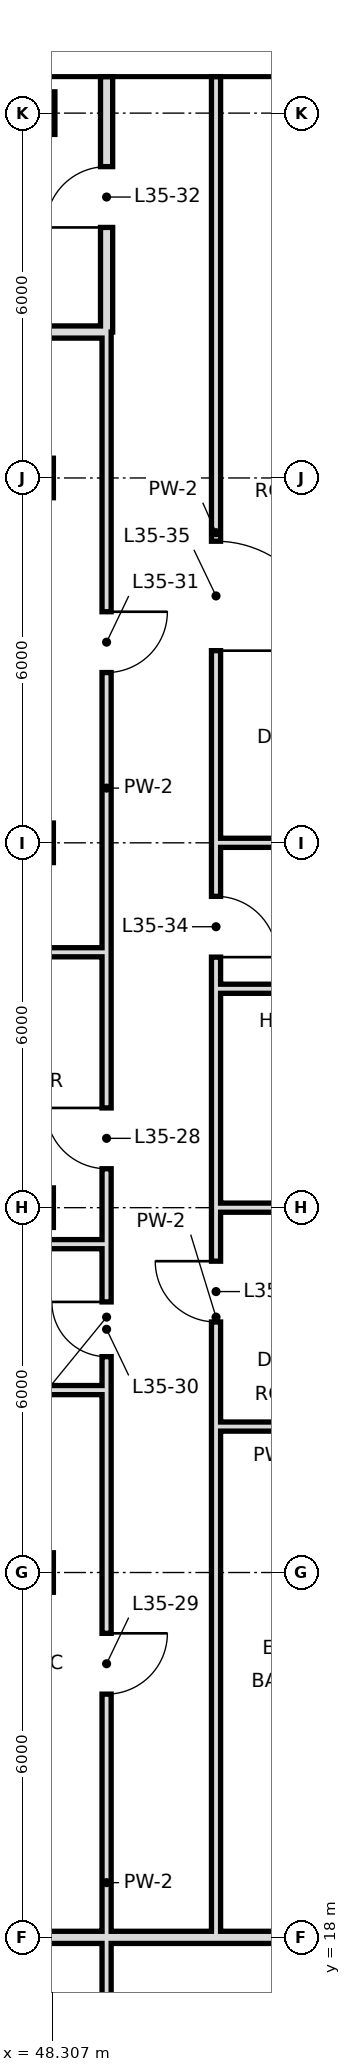
"""IFC4 building model, lengths in metres.
Left out: names, types, materials, properties, quantities, classifications, styles, units other than length and angle.
Written with IfcOpenShell. Run it as: python <this file> out.ifc"""

import sys

from ifc_helpers import new_model, si_unit, direction, frame, frame_2d, origin, origin_2d, place, context, subcontext, project, spatial, rectangle, hollow_rectangle, extrude, element, fill, save


model = new_model("IFC4")
c1 = context("Model", 3, precision=1e-05, world=origin(), true_north=direction((0.0, 1.0)))
c2 = subcontext(c1, "Body", "Model", "MODEL_VIEW")
j1 = project(units=[si_unit("LENGTHUNIT", "METRE"), si_unit("PLANEANGLEUNIT", "RADIAN")], contexts=[c1])
p1 = place(None, origin())
s1 = spatial("IfcSite", under=j1, at=p1, CompositionType="ELEMENT")
p2 = place(p1, origin())
s2 = spatial("IfcBuilding", under=s1, at=p2, CompositionType="ELEMENT")
p3 = place(p2, frame((0.0, 0.0, 154.6)))
s3 = spatial("IfcBuildingStorey", under=s2, at=p3, CompositionType="ELEMENT", Elevation=154.6)
for number, where, z_axis, x_axis in (
    (1, (48.0, 24.0, 0.0), (0.0, 0.0, 1.0), (1.0, 0.0, 0.0)),
    (2, (48.0, 30.0, 0.0), (0.0, 0.0, 1.0), (1.0, 0.0, 0.0)),
    (3, (48.0, 36.0, 0.0), (0.0, 0.0, 1.0), (1.0, 0.0, 0.0)),
    (4, (48.0, 42.0, 0.0), (0.0, 0.0, 1.0), (1.0, 0.0, 0.0)),
):
    element("IfcColumn", number, at=place(p3, frame(where, z_axis=z_axis, x_axis=x_axis)), inside=s3, PredefinedType="COLUMN", context=c2, shape_type="SweptSolid", body=[
        extrude(hollow_rectangle(XDim=0.65, YDim=0.65, WallThickness=0.032, at=origin_2d()), origin(), (0.0, 0.0, 1.0), 3.6),
    ])
p4 = place(p3, frame((48.0, 48.0, 0.0), z_axis=(0.0, 0.0, 1.0), x_axis=(1.0, 0.0, 0.0)))
e5 = element("IfcColumn", 5, at=p4, inside=s3, PredefinedType="COLUMN", context=c2, shape_type="SweptSolid", body=[
    extrude(hollow_rectangle(XDim=0.7, YDim=0.7, WallThickness=0.036, at=origin_2d()), origin(), (0.0, 0.0, 1.0), 3.6),
])
p5 = place(p3, frame((49.2, 44.4, 0.0), z_axis=(0.0, 0.0, 1.0), x_axis=(0.0, 1.0, 0.0)))
e6 = element("IfcWall", 6, at=p5, inside=s3, PredefinedType="SOLIDWALL", context=c2, shape_type="SweptSolid", body=[
    extrude(rectangle(XDim=4.2, YDim=0.2, at=frame_2d((2.1, 0.0))), origin(), (0.0, 0.0, 1.0), 2.97),
])
p6 = place(p5, frame((1.72, 0.0, 0.0)))
e7 = element("IfcOpeningElement", 7, at=p6, cuts=e6, PredefinedType="OPENING", context=c2, shape_type="SweptSolid", body=[
    extrude(rectangle(XDim=1.0, YDim=2.4, at=frame_2d((0.5, 1.2))), frame((0.0, 0.11, 0.0), z_axis=(0.0, -1.0, 0.0), x_axis=(1.0, 0.0, 0.0)), (0.0, 0.0, 1.0), 0.22),
])
p7 = place(p3, frame((49.2, 10.8, 0.0), z_axis=(0.0, 0.0, 1.0), x_axis=(0.0, 1.0, 0.0)))
e8 = element("IfcWall", 8, at=p7, inside=s3, PredefinedType="PARTITIONING", context=c2, shape_type="SweptSolid", body=[
    extrude(rectangle(XDim=16.2, YDim=0.15, at=frame_2d((8.1, 0.0))), origin(), (0.0, 0.0, 1.0), 3.42),
])
p8 = place(p7, frame((11.2, 0.0, 0.0)))
e9 = element("IfcOpeningElement", 9, at=p8, cuts=e8, PredefinedType="OPENING", context=c2, shape_type="SweptSolid", body=[
    extrude(rectangle(XDim=1.0, YDim=2.4, at=frame_2d((0.5, 1.2))), frame((0.0, 0.085, 0.0), z_axis=(0.0, -1.0, 0.0), x_axis=(1.0, 0.0, 0.0)), (0.0, 0.0, 1.0), 0.17),
])
p9 = place(p3, frame((49.2, 29.4, 0.0), z_axis=(0.0, 0.0, 1.0), x_axis=(0.0, 1.0, 0.0)))
e10 = element("IfcWall", 10, at=p9, inside=s3, PredefinedType="PARTITIONING", context=c2, shape_type="SweptSolid", body=[
    extrude(rectangle(XDim=15.0, YDim=0.15, at=frame_2d((7.5, 0.0))), origin(), (0.0, 0.0, 1.0), 3.42),
])
p10 = place(p9, frame((1.24, 0.0, 0.0)))
e11 = element("IfcOpeningElement", 11, at=p10, cuts=e10, PredefinedType="OPENING", context=c2, shape_type="SweptSolid", body=[
    extrude(rectangle(XDim=1.0, YDim=2.4, at=frame_2d((0.5, 1.2))), frame((0.0, 0.085, 0.0), z_axis=(0.0, -1.0, 0.0), x_axis=(1.0, 0.0, 0.0)), (0.0, 0.0, 1.0), 0.17),
])
p11 = place(p9, frame((9.4, 0.0, 0.0)))
e12 = element("IfcOpeningElement", 12, at=p11, cuts=e10, PredefinedType="OPENING", context=c2, shape_type="SweptSolid", body=[
    extrude(rectangle(XDim=1.0, YDim=2.4, at=frame_2d((0.5, 1.2))), frame((0.0, 0.085, 0.0), z_axis=(0.0, -1.0, 0.0), x_axis=(1.0, 0.0, 0.0)), (0.0, 0.0, 1.0), 0.17),
])
p12 = place(p3, frame((49.2, 27.0, 0.0), z_axis=(0.0, 0.0, 1.0), x_axis=(0.0, 1.0, 0.0)))
e13 = element("IfcWall", 13, at=p12, inside=s3, PredefinedType="PARTITIONING", context=c2, shape_type="SweptSolid", body=[
    extrude(rectangle(XDim=2.4, YDim=0.15, at=frame_2d((1.2, 0.0))), origin(), (0.0, 0.0, 1.0), 3.42),
])
p13 = place(p12, frame((0.55, 0.0, 0.0)))
e14 = element("IfcOpeningElement", 14, at=p13, cuts=e13, PredefinedType="OPENING", context=c2, shape_type="SweptSolid", body=[
    extrude(rectangle(XDim=0.9, YDim=2.4, at=frame_2d((0.45, 1.2))), frame((0.0, 0.085, 0.0), z_axis=(0.0, -1.0, 0.0), x_axis=(1.0, 0.0, 0.0)), (0.0, 0.0, 1.0), 0.17),
])
p14 = place(p3, frame((51.0, 26.4, 0.0), z_axis=(0.0, 0.0, 1.0), x_axis=(0.0, 1.0, 0.0)))
e15 = element("IfcWall", 15, at=p14, inside=s3, PredefinedType="PARTITIONING", context=c2, shape_type="SweptSolid", body=[
    extrude(rectangle(XDim=3.6, YDim=0.15, at=frame_2d((1.8, 0.0))), origin(), (0.0, 0.0, 1.0), 3.42),
])
p15 = place(p14, frame((1.72, 0.0, 0.0)))
e16 = element("IfcOpeningElement", 16, at=p15, cuts=e15, PredefinedType="OPENING", context=c2, shape_type="SweptSolid", body=[
    extrude(rectangle(XDim=1.0, YDim=2.4, at=frame_2d((0.5, 1.2))), frame((0.0, 0.085, 0.0), z_axis=(0.0, -1.0, 0.0), x_axis=(1.0, 0.0, 0.0)), (0.0, 0.0, 1.0), 0.17),
])
p16 = place(p3, frame((51.0, 33.6, 0.0), z_axis=(0.0, 0.0, 1.0), x_axis=(0.0, 1.0, 0.0)))
e17 = element("IfcWall", 17, at=p16, inside=s3, PredefinedType="PARTITIONING", context=c2, shape_type="SweptSolid", body=[
    extrude(rectangle(XDim=15.0, YDim=0.15, at=frame_2d((7.5, 0.0))), origin(), (0.0, 0.0, 1.0), 3.42),
])
p17 = place(p16, frame((0.52, 0.0, 0.0)))
e18 = element("IfcOpeningElement", 18, at=p17, cuts=e17, PredefinedType="OPENING", context=c2, shape_type="SweptSolid", body=[
    extrude(rectangle(XDim=1.0, YDim=2.4, at=frame_2d((0.5, 1.2))), frame((0.0, 0.085, 0.0), z_axis=(0.0, -1.0, 0.0), x_axis=(1.0, 0.0, 0.0)), (0.0, 0.0, 1.0), 0.17),
])
p18 = place(p16, frame((5.56, 0.0, 0.0)))
e19 = element("IfcOpeningElement", 19, at=p18, cuts=e17, PredefinedType="OPENING", context=c2, shape_type="SweptSolid", body=[
    extrude(rectangle(XDim=1.8, YDim=2.4, at=frame_2d((0.9, 1.2))), frame((0.0, 0.085, 0.0), z_axis=(0.0, -1.0, 0.0), x_axis=(1.0, 0.0, 0.0)), (0.0, 0.0, 1.0), 0.17),
])
p19 = place(p3, frame((51.0, 18.0, 0.0), z_axis=(0.0, 0.0, 1.0), x_axis=(0.0, 1.0, 0.0)))
e20 = element("IfcWall", 20, at=p19, inside=s3, PredefinedType="PARTITIONING", context=c2, shape_type="SweptSolid", body=[
    extrude(rectangle(XDim=8.4, YDim=0.15, at=frame_2d((4.2, 0.0))), origin(), (0.0, 0.0, 1.0), 3.42),
])
p20 = place(p3, frame((51.0, 30.0, 0.0), z_axis=(0.0, 0.0, 1.0), x_axis=(0.0, 1.0, 0.0)))
e21 = element("IfcWall", 21, at=p20, inside=s3, PredefinedType="PARTITIONING", context=c2, shape_type="SweptSolid", body=[
    extrude(rectangle(XDim=3.6, YDim=0.15, at=frame_2d((1.8, 0.0))), origin(), (0.0, 0.0, 1.0), 3.42),
])
p21 = place(p3, frame((44.9, 18.0, 0.0), z_axis=(0.0, 0.0, 1.0), x_axis=(1.0, 0.0, 0.0)))
e22 = element("IfcWall", 22, at=p21, inside=s3, PredefinedType="SOLIDWALL", context=c2, shape_type="SweptSolid", body=[
    extrude(rectangle(XDim=15.7, YDim=0.2, at=frame_2d((7.85, 0.0))), origin(), (0.0, 0.0, 1.0), 2.72),
])
p22 = place(p3, frame((51.0, 26.4, 0.0), z_axis=(0.0, 0.0, 1.0), x_axis=(1.0, 0.0, 0.0)))
e23 = element("IfcWall", 23, at=p22, inside=s3, PredefinedType="PARTITIONING", context=c2, shape_type="SweptSolid", body=[
    extrude(rectangle(XDim=3.0, YDim=0.15, at=frame_2d((1.5, 0.0))), origin(), (0.0, 0.0, 1.0), 3.42),
])
for number, where, z_axis, x_axis in (
    (24, (44.9, 27.0, 0.0), (0.0, 0.0, 1.0), (1.0, 0.0, 0.0)),
    (25, (44.9, 29.4, 0.0), (0.0, 0.0, 1.0), (1.0, 0.0, 0.0)),
):
    element("IfcWall", number, at=place(p3, frame(where, z_axis=z_axis, x_axis=x_axis)), inside=s3, PredefinedType="PARTITIONING", context=c2, shape_type="SweptSolid", body=[
        extrude(rectangle(XDim=4.3, YDim=0.15, at=frame_2d((2.15, 0.0))), origin(), (0.0, 0.0, 1.0), 3.42),
    ])
p23 = place(p3, frame((51.0, 30.0, 0.0), z_axis=(0.0, 0.0, 1.0), x_axis=(1.0, 0.0, 0.0)))
e26 = element("IfcWall", 26, at=p23, inside=s3, PredefinedType="PARTITIONING", context=c2, shape_type="SweptSolid", body=[
    extrude(rectangle(XDim=3.0, YDim=0.15, at=frame_2d((1.5, 0.0))), origin(), (0.0, 0.0, 1.0), 2.72),
])
p24 = place(p3, frame((51.0, 33.6, 0.0), z_axis=(0.0, 0.0, 1.0), x_axis=(1.0, 0.0, 0.0)))
e27 = element("IfcWall", 27, at=p24, inside=s3, PredefinedType="PARTITIONING", context=c2, shape_type="SweptSolid", body=[
    extrude(rectangle(XDim=3.0, YDim=0.15, at=frame_2d((1.5, 0.0))), origin(), (0.0, 0.0, 1.0), 3.42),
])
p25 = place(p3, frame((44.9, 34.2, 0.0), z_axis=(0.0, 0.0, 1.0), x_axis=(1.0, 0.0, 0.0)))
e28 = element("IfcWall", 28, at=p25, inside=s3, PredefinedType="PARTITIONING", context=c2, shape_type="SweptSolid", body=[
    extrude(rectangle(XDim=4.3, YDim=0.15, at=frame_2d((2.15, 0.0))), origin(), (0.0, 0.0, 1.0), 3.42),
])
p26 = place(p3, frame((51.0, 36.0, 0.0), z_axis=(0.0, 0.0, 1.0), x_axis=(1.0, 0.0, 0.0)))
e29 = element("IfcWall", 29, at=p26, inside=s3, PredefinedType="PARTITIONING", context=c2, shape_type="SweptSolid", body=[
    extrude(rectangle(XDim=9.0, YDim=0.15, at=frame_2d((4.5, 0.0))), origin(), (0.0, 0.0, 1.0), 2.72),
])
p27 = place(p3, frame((44.9, 44.4, 0.0), z_axis=(0.0, 0.0, 1.0), x_axis=(1.0, 0.0, 0.0)))
e30 = element("IfcWall", 30, at=p27, inside=s3, PredefinedType="SOLIDWALL", context=c2, shape_type="SweptSolid", body=[
    extrude(rectangle(XDim=4.3, YDim=0.2, at=frame_2d((2.15, 0.0))), origin(), (0.0, 0.0, 1.0), 2.97),
])
p28 = place(p10, frame((1.0, 0.0, 0.0), z_axis=(0.0, 0.0, 1.0), x_axis=(-1.0, 0.0, 0.0)))
e31 = element("IfcDoor", 31, at=p28, inside=s3, OperationType="SINGLE_SWING_LEFT", PredefinedType="DOOR", context=c2, shape_type="SweptSolid", body=[
    extrude(rectangle(XDim=1.0, YDim=2.4, at=frame_2d((0.5, 1.2))), frame((0.0, 0.025, 0.0), z_axis=(0.0, -1.0, 0.0), x_axis=(1.0, 0.0, 0.0)), (0.0, 0.0, 1.0), 0.05),
])
fill(e11, e31)
p29 = place(p8, origin())
e32 = element("IfcDoor", 32, at=p29, inside=s3, OperationType="SINGLE_SWING_RIGHT", PredefinedType="DOOR", context=c2, shape_type="SweptSolid", body=[
    extrude(rectangle(XDim=1.0, YDim=2.4, at=frame_2d((0.5, 1.2))), frame((0.0, 0.025, 0.0), z_axis=(0.0, -1.0, 0.0), x_axis=(1.0, 0.0, 0.0)), (0.0, 0.0, 1.0), 0.05),
])
fill(e9, e32)
p30 = place(p13, frame((0.9, 0.0, 0.0), z_axis=(0.0, 0.0, 1.0), x_axis=(-1.0, 0.0, 0.0)))
e33 = element("IfcDoor", 33, at=p30, inside=s3, OperationType="SINGLE_SWING_LEFT", PredefinedType="DOOR", context=c2, shape_type="SweptSolid", body=[
    extrude(rectangle(XDim=0.9, YDim=2.4, at=frame_2d((0.45, 1.2))), frame((0.0, 0.025, 0.0), z_axis=(0.0, -1.0, 0.0), x_axis=(1.0, 0.0, 0.0)), (0.0, 0.0, 1.0), 0.05),
])
fill(e14, e33)
p31 = place(p11, origin())
e34 = element("IfcDoor", 34, at=p31, inside=s3, OperationType="SINGLE_SWING_RIGHT", PredefinedType="DOOR", context=c2, shape_type="SweptSolid", body=[
    extrude(rectangle(XDim=1.0, YDim=2.4, at=frame_2d((0.5, 1.2))), frame((0.0, 0.025, 0.0), z_axis=(0.0, -1.0, 0.0), x_axis=(1.0, 0.0, 0.0)), (0.0, 0.0, 1.0), 0.05),
])
fill(e12, e34)
p32 = place(p6, origin())
e35 = element("IfcDoor", 35, at=p32, inside=s3, OperationType="SINGLE_SWING_LEFT", PredefinedType="DOOR", context=c2, shape_type="SweptSolid", body=[
    extrude(rectangle(XDim=1.0, YDim=2.4, at=frame_2d((0.5, 1.2))), frame((0.0, 0.025, 0.0), z_axis=(0.0, -1.0, 0.0), x_axis=(1.0, 0.0, 0.0)), (0.0, 0.0, 1.0), 0.05),
])
fill(e7, e35)
p33 = place(p15, frame((1.0, 0.0, 0.0), z_axis=(0.0, 0.0, 1.0), x_axis=(-1.0, 0.0, 0.0)))
e36 = element("IfcDoor", 36, at=p33, inside=s3, OperationType="SINGLE_SWING_LEFT", PredefinedType="DOOR", context=c2, shape_type="SweptSolid", body=[
    extrude(rectangle(XDim=1.0, YDim=2.4, at=frame_2d((0.5, 1.2))), frame((0.0, 0.025, 0.0), z_axis=(0.0, -1.0, 0.0), x_axis=(1.0, 0.0, 0.0)), (0.0, 0.0, 1.0), 0.05),
])
fill(e16, e36)
p34 = place(p17, frame((1.0, 0.0, 0.0), z_axis=(0.0, 0.0, 1.0), x_axis=(-1.0, 0.0, 0.0)))
e37 = element("IfcDoor", 37, at=p34, inside=s3, OperationType="SINGLE_SWING_RIGHT", PredefinedType="DOOR", context=c2, shape_type="SweptSolid", body=[
    extrude(rectangle(XDim=1.0, YDim=2.4, at=frame_2d((0.5, 1.2))), frame((0.0, 0.025, 0.0), z_axis=(0.0, -1.0, 0.0), x_axis=(1.0, 0.0, 0.0)), (0.0, 0.0, 1.0), 0.05),
])
fill(e18, e37)
p35 = place(p18, frame((1.8, 0.0, 0.0), z_axis=(0.0, 0.0, 1.0), x_axis=(-1.0, 0.0, 0.0)))
e38 = element("IfcDoor", 38, at=p35, inside=s3, OperationType="SINGLE_SWING_RIGHT", PredefinedType="DOOR", context=c2, shape_type="SweptSolid", body=[
    extrude(rectangle(XDim=1.8, YDim=2.4, at=frame_2d((0.9, 1.2))), frame((0.0, 0.025, 0.0), z_axis=(0.0, -1.0, 0.0), x_axis=(1.0, 0.0, 0.0)), (0.0, 0.0, 1.0), 0.05),
])
fill(e19, e38)
save(model, sys.argv[1])
